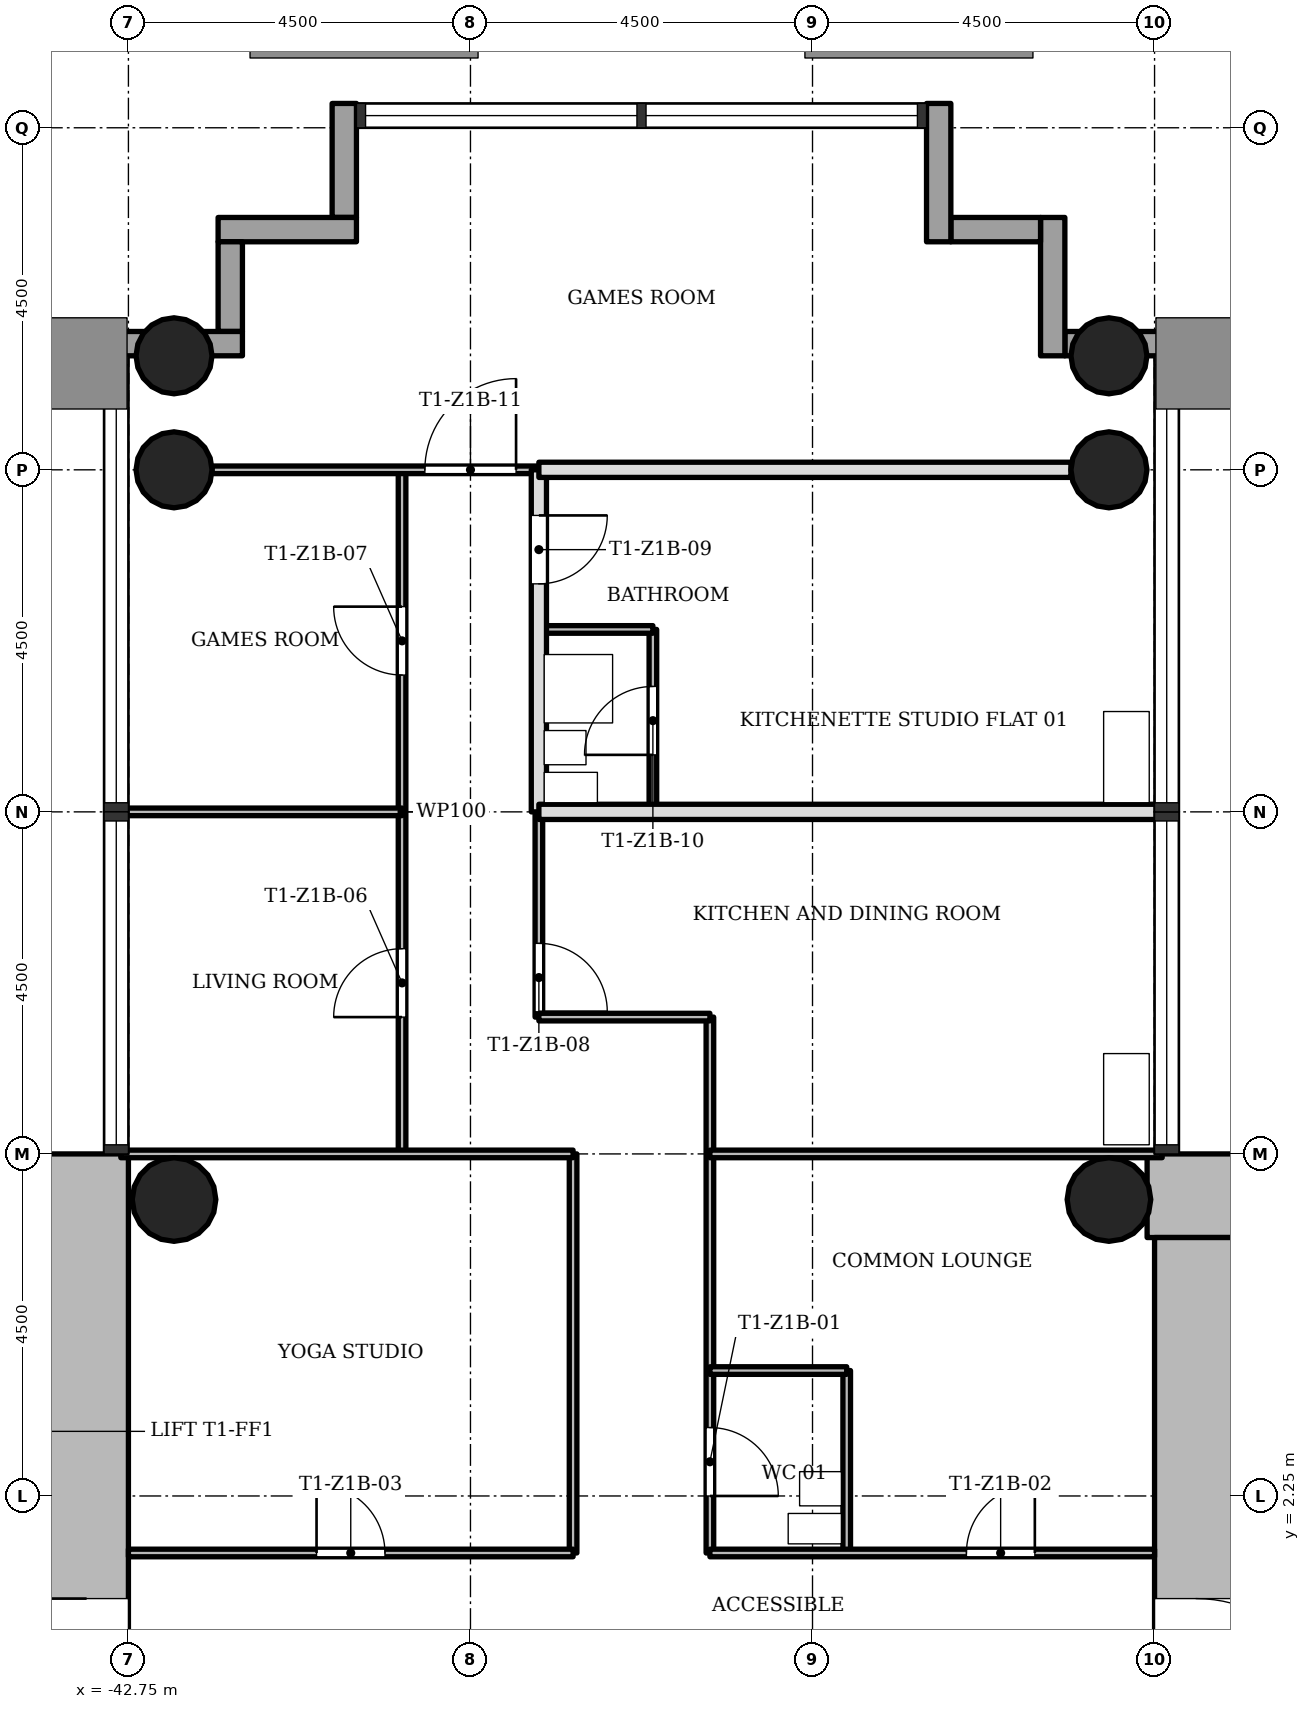
"""IFC4 building model, lengths in metres.
Left out: names, types, materials, properties, quantities, classifications, styles, units other than length and angle.
Written with IfcOpenShell. Run it as: python <this file> out.ifc"""

import sys

from ifc_helpers import new_model, si_unit, direction, frame, frame_2d, origin, origin_2d, place, context, subcontext, project, spatial, rectangle, hollow_circle, extrude, element, fill, save


model = new_model("IFC4")
c1 = context("Model", 3, precision=1e-05, world=origin(), true_north=direction((0.0, 1.0)))
c2 = subcontext(c1, "Body", "Model", "MODEL_VIEW")
j1 = project(units=[si_unit("LENGTHUNIT", "METRE"), si_unit("PLANEANGLEUNIT", "RADIAN")], contexts=[c1])
p1 = place(None, origin())
s1 = spatial("IfcSite", under=j1, at=p1, CompositionType="ELEMENT")
p2 = place(p1, origin())
s2 = spatial("IfcBuilding", under=s1, at=p2, CompositionType="ELEMENT")
p3 = place(p2, frame((0.0, 0.0, 38.1)))
s3 = spatial("IfcBuildingStorey", under=s2, at=p3, CompositionType="ELEMENT", Elevation=38.1)
p4 = place(p3, frame((-21.35, 6.2, 0.0), z_axis=(0.0, 0.0, 1.0), x_axis=(-1.0, 0.0, 0.0)))
e1 = element("IfcWall", 1, at=p4, inside=s3, PredefinedType="SHEAR", context=c2, shape_type="SweptSolid", body=[
    extrude(rectangle(XDim=7.998, YDim=1.1, at=frame_2d((3.999, 0.0))), origin(), (0.0, 0.0, 1.0), 3.4),
])
p5 = place(p3, frame((-28.7, 5.65, 0.0), z_axis=(0.0, 0.0, 1.0), x_axis=(0.0, -1.0, 0.0)))
e2 = element("IfcWall", 2, at=p5, inside=s3, PredefinedType="SHEAR", context=c2, shape_type="SweptSolid", body=[
    extrude(rectangle(XDim=12.4, YDim=1.1, at=frame_2d((6.2, 0.0))), origin(), (0.0, 0.0, 1.0), 3.4),
])
p6 = place(p5, frame((4.75, 0.0, 0.0)))
e3 = element("IfcOpeningElement", 3, at=p6, cuts=e2, PredefinedType="OPENING", context=c2, shape_type="SweptSolid", body=[
    extrude(rectangle(XDim=1.8, YDim=2.1, at=frame_2d((0.9, 1.05))), frame((0.0, 0.56, 0.0), z_axis=(0.0, -1.0, 0.0), x_axis=(1.0, 0.0, 0.0)), (0.0, 0.0, 1.0), 1.12),
])
p7 = place(p3, frame((-43.3, -5.65, 0.0), z_axis=(0.0, 0.0, 1.0), x_axis=(0.0, 1.0, 0.0)))
e4 = element("IfcWall", 4, at=p7, inside=s3, PredefinedType="SHEAR", context=c2, shape_type="SweptSolid", body=[
    extrude(rectangle(XDim=12.4, YDim=1.1, at=frame_2d((6.2, 0.0))), origin(), (0.0, 0.0, 1.0), 3.4),
])
p8 = place(p7, frame((4.75, 0.0, 0.0)))
e5 = element("IfcOpeningElement", 5, at=p8, cuts=e4, PredefinedType="OPENING", context=c2, shape_type="SweptSolid", body=[
    extrude(rectangle(XDim=1.8, YDim=2.1, at=frame_2d((0.9, 1.05))), frame((0.0, 0.56, 0.0), z_axis=(0.0, -1.0, 0.0), x_axis=(1.0, 0.0, 0.0)), (0.0, 0.0, 1.0), 1.12),
])
for number, where, z_axis, x_axis in (
    (6, (-29.85, 15.75, 0.0), (0.0, 0.0, 1.0), (1.0, 0.0, 0.0)),
    (7, (-42.15, 15.75, 0.0), (0.0, 0.0, 1.0), (1.0, 0.0, 0.0)),
    (8, (-29.85, 17.25, 0.0), (0.0, 0.0, 1.0), (1.0, 0.0, 0.0)),
    (9, (-42.15, 17.25, 0.0), (0.0, 0.0, 1.0), (1.0, 0.0, 0.0)),
):
    element("IfcColumn", number, at=place(p3, frame(where, z_axis=z_axis, x_axis=x_axis)), inside=s3, PredefinedType="COLUMN", context=c2, shape_type="SweptSolid", body=[
        extrude(hollow_circle(Radius=0.5, WallThickness=0.036, at=origin_2d()), origin(), (0.0, 0.0, 1.0), 3.4),
    ])
for number, where, z_axis, x_axis in (
    (10, (-29.85, 6.15, 0.0), (0.0, 0.0, 1.0), (1.0, 0.0, 0.0)),
    (11, (-42.15, 6.15, 0.0), (0.0, 0.0, 1.0), (1.0, 0.0, 0.0)),
):
    element("IfcColumn", number, at=place(p3, frame(where, z_axis=z_axis, x_axis=x_axis)), inside=s3, PredefinedType="COLUMN", context=c2, shape_type="SweptSolid", body=[
        extrude(hollow_circle(Radius=0.55, WallThickness=0.04, at=origin_2d()), origin(), (0.0, 0.0, 1.0), 3.4),
    ])
p9 = place(p3, frame((-28.93, 17.41, -0.3), z_axis=(0.0, 0.0, 1.0), x_axis=(-1.0, 0.0, 0.0)))
e12 = element("IfcWall", 12, at=p9, inside=s3, PredefinedType="STANDARD", context=c2, shape_type="SweptSolid", body=[
    extrude(rectangle(XDim=1.5, YDim=0.32, at=frame_2d((0.75, 0.0))), origin(), (0.0, 0.0, 1.0), 3.4),
])
p10 = place(p3, frame((-30.59, 17.25, -0.3), z_axis=(0.0, 0.0, 1.0), x_axis=(0.0, 1.0, 0.0)))
e13 = element("IfcWall", 13, at=p10, inside=s3, PredefinedType="STANDARD", context=c2, shape_type="SweptSolid", body=[
    extrude(rectangle(XDim=1.82, YDim=0.32, at=frame_2d((0.91, 0.0))), origin(), (0.0, 0.0, 1.0), 3.4),
])
p11 = place(p3, frame((-30.75, 18.91, -0.3), z_axis=(0.0, 0.0, 1.0), x_axis=(-1.0, 0.0, 0.0)))
e14 = element("IfcWall", 14, at=p11, inside=s3, PredefinedType="STANDARD", context=c2, shape_type="SweptSolid", body=[
    extrude(rectangle(XDim=1.18, YDim=0.32, at=frame_2d((0.59, 0.0))), origin(), (0.0, 0.0, 1.0), 3.4),
])
p12 = place(p3, frame((-32.09, 18.75, -0.3), z_axis=(0.0, 0.0, 1.0), x_axis=(0.0, 1.0, 0.0)))
e15 = element("IfcWall", 15, at=p12, inside=s3, PredefinedType="STANDARD", context=c2, shape_type="SweptSolid", body=[
    extrude(rectangle(XDim=1.82, YDim=0.32, at=frame_2d((0.91, 0.0))), origin(), (0.0, 0.0, 1.0), 3.4),
])
p13 = place(p3, frame((-39.91, 20.57, -0.3), z_axis=(0.0, 0.0, 1.0), x_axis=(0.0, -1.0, 0.0)))
e16 = element("IfcWall", 16, at=p13, inside=s3, PredefinedType="STANDARD", context=c2, shape_type="SweptSolid", body=[
    extrude(rectangle(XDim=1.5, YDim=0.32, at=frame_2d((0.75, 0.0))), origin(), (0.0, 0.0, 1.0), 3.4),
])
p14 = place(p3, frame((-39.75, 18.91, -0.3), z_axis=(0.0, 0.0, 1.0), x_axis=(-1.0, 0.0, 0.0)))
e17 = element("IfcWall", 17, at=p14, inside=s3, PredefinedType="STANDARD", context=c2, shape_type="SweptSolid", body=[
    extrude(rectangle(XDim=1.82, YDim=0.32, at=frame_2d((0.91, 0.0))), origin(), (0.0, 0.0, 1.0), 3.4),
])
p15 = place(p3, frame((-41.41, 18.75, -0.3), z_axis=(0.0, 0.0, 1.0), x_axis=(0.0, -1.0, 0.0)))
e18 = element("IfcWall", 18, at=p15, inside=s3, PredefinedType="STANDARD", context=c2, shape_type="SweptSolid", body=[
    extrude(rectangle(XDim=1.18, YDim=0.32, at=frame_2d((0.59, 0.0))), origin(), (0.0, 0.0, 1.0), 3.4),
])
p16 = place(p3, frame((-41.25, 17.41, -0.3), z_axis=(0.0, 0.0, 1.0), x_axis=(-1.0, 0.0, 0.0)))
e19 = element("IfcWall", 19, at=p16, inside=s3, PredefinedType="STANDARD", context=c2, shape_type="SweptSolid", body=[
    extrude(rectangle(XDim=1.82, YDim=0.32, at=frame_2d((0.91, 0.0))), origin(), (0.0, 0.0, 1.0), 3.4),
])
p17 = place(p3, frame((-39.15, 6.75, 0.0), z_axis=(0.0, 0.0, 1.0), x_axis=(0.0, 1.0, 0.0)))
e20 = element("IfcWall", 20, at=p17, inside=s3, PredefinedType="PARTITIONING", context=c2, shape_type="SweptSolid", body=[
    extrude(rectangle(XDim=9.0, YDim=0.1, at=frame_2d((4.5, 0.0))), origin(), (0.0, 0.0, 1.0), 3.0),
])
p18 = place(p17, frame((1.8, 0.0, 0.0)))
e21 = element("IfcOpeningElement", 21, at=p18, cuts=e20, PredefinedType="OPENING", context=c2, shape_type="SweptSolid", body=[
    extrude(rectangle(XDim=0.9, YDim=2.1, at=frame_2d((0.45, 1.05))), frame((0.0, 0.06, 0.0), z_axis=(0.0, -1.0, 0.0), x_axis=(1.0, 0.0, 0.0)), (0.0, 0.0, 1.0), 0.12),
])
p19 = place(p17, frame((6.3, 0.0, 0.0)))
e22 = element("IfcOpeningElement", 22, at=p19, cuts=e20, PredefinedType="OPENING", context=c2, shape_type="SweptSolid", body=[
    extrude(rectangle(XDim=0.9, YDim=2.1, at=frame_2d((0.45, 1.05))), frame((0.0, 0.06, 0.0), z_axis=(0.0, -1.0, 0.0), x_axis=(1.0, 0.0, 0.0)), (0.0, 0.0, 1.0), 0.12),
])
p20 = place(p3, frame((-37.35, 8.55, 0.0), z_axis=(0.0, 0.0, 1.0), x_axis=(0.0, 1.0, 0.0)))
e23 = element("IfcWall", 23, at=p20, inside=s3, PredefinedType="PARTITIONING", context=c2, shape_type="SweptSolid", body=[
    extrude(rectangle(XDim=2.7, YDim=0.1, at=frame_2d((1.35, 0.0))), origin(), (0.0, 0.0, 1.0), 3.0),
])
p21 = place(p20, frame((0.07, 0.0, 0.0)))
e24 = element("IfcOpeningElement", 24, at=p21, cuts=e23, PredefinedType="OPENING", context=c2, shape_type="SweptSolid", body=[
    extrude(rectangle(XDim=0.9, YDim=2.1, at=frame_2d((0.45, 1.05))), frame((0.0, 0.06, 0.0), z_axis=(0.0, -1.0, 0.0), x_axis=(1.0, 0.0, 0.0)), (0.0, 0.0, 1.0), 0.12),
])
p22 = place(p3, frame((-37.35, 11.25, 0.0), z_axis=(0.0, 0.0, 1.0), x_axis=(0.0, 1.0, 0.0)))
e25 = element("IfcWall", 25, at=p22, inside=s3, PredefinedType="SOLIDWALL", context=c2, shape_type="SweptSolid", body=[
    extrude(rectangle(XDim=4.5, YDim=0.2, at=frame_2d((2.25, 0.0))), origin(), (0.0, 0.0, 1.0), 3.0),
])
p23 = place(p22, frame((3.0, 0.0, 0.0)))
e26 = element("IfcOpeningElement", 26, at=p23, cuts=e25, PredefinedType="OPENING", context=c2, shape_type="SweptSolid", body=[
    extrude(rectangle(XDim=0.9, YDim=2.1, at=frame_2d((0.45, 1.05))), frame((0.0, 0.11, 0.0), z_axis=(0.0, -1.0, 0.0), x_axis=(1.0, 0.0, 0.0)), (0.0, 0.0, 1.0), 0.22),
])
p24 = place(p3, frame((-36.9, 1.5, 0.0), z_axis=(0.0, 0.0, 1.0), x_axis=(0.0, 1.0, 0.0)))
e27 = element("IfcWall", 27, at=p24, inside=s3, PredefinedType="PARTITIONING", context=c2, shape_type="SweptSolid", body=[
    extrude(rectangle(XDim=5.25, YDim=0.1, at=frame_2d((2.625, 0.0))), origin(), (0.0, 0.0, 1.0), 3.0),
])
p25 = place(p3, frame((-35.85, 11.25, 0.0), z_axis=(0.0, 0.0, 1.0), x_axis=(0.0, 1.0, 0.0)))
e28 = element("IfcWall", 28, at=p25, inside=s3, PredefinedType="PARTITIONING", context=c2, shape_type="SweptSolid", body=[
    extrude(rectangle(XDim=2.4, YDim=0.1, at=frame_2d((1.2, 0.0))), origin(), (0.0, 0.0, 1.0), 3.0),
])
p26 = place(p25, frame((0.75, 0.0, 0.0)))
e29 = element("IfcOpeningElement", 29, at=p26, cuts=e28, PredefinedType="OPENING", context=c2, shape_type="SweptSolid", body=[
    extrude(rectangle(XDim=0.9, YDim=2.1, at=frame_2d((0.45, 1.05))), frame((0.0, 0.06, 0.0), z_axis=(0.0, -1.0, 0.0), x_axis=(1.0, 0.0, 0.0)), (0.0, 0.0, 1.0), 0.12),
])
p27 = place(p3, frame((-35.1, 1.5, 0.0), z_axis=(0.0, 0.0, 1.0), x_axis=(0.0, 1.0, 0.0)))
e30 = element("IfcWall", 30, at=p27, inside=s3, PredefinedType="PARTITIONING", context=c2, shape_type="SweptSolid", body=[
    extrude(rectangle(XDim=7.05, YDim=0.1, at=frame_2d((3.525, 0.0))), origin(), (0.0, 0.0, 1.0), 3.0),
])
p28 = place(p27, frame((0.75, 0.0, 0.0)))
e31 = element("IfcOpeningElement", 31, at=p28, cuts=e30, PredefinedType="OPENING", context=c2, shape_type="SweptSolid", body=[
    extrude(rectangle(XDim=0.9, YDim=2.1, at=frame_2d((0.45, 1.05))), frame((0.0, 0.06, 0.0), z_axis=(0.0, -1.0, 0.0), x_axis=(1.0, 0.0, 0.0)), (0.0, 0.0, 1.0), 0.12),
])
p29 = place(p3, frame((-33.3, 1.5, 0.0), z_axis=(0.0, 0.0, 1.0), x_axis=(0.0, 1.0, 0.0)))
e32 = element("IfcWall", 32, at=p29, inside=s3, PredefinedType="PARTITIONING", context=c2, shape_type="SweptSolid", body=[
    extrude(rectangle(XDim=2.4, YDim=0.1, at=frame_2d((1.2, 0.0))), origin(), (0.0, 0.0, 1.0), 3.0),
])
p30 = place(p3, frame((-42.75, 1.5, 0.0), z_axis=(0.0, 0.0, 1.0), x_axis=(1.0, 0.0, 0.0)))
e33 = element("IfcWall", 33, at=p30, inside=s3, PredefinedType="PARTITIONING", context=c2, shape_type="SweptSolid", body=[
    extrude(rectangle(XDim=5.85, YDim=0.1, at=frame_2d((2.925, 0.0))), origin(), (0.0, 0.0, 1.0), 3.0),
])
p31 = place(p30, frame((2.475, 0.0, 0.0)))
e34 = element("IfcOpeningElement", 34, at=p31, cuts=e33, PredefinedType="OPENING", context=c2, shape_type="SweptSolid", body=[
    extrude(rectangle(XDim=0.9, YDim=2.1, at=frame_2d((0.45, 1.05))), frame((0.0, 0.06, 0.0), z_axis=(0.0, -1.0, 0.0), x_axis=(1.0, 0.0, 0.0)), (0.0, 0.0, 1.0), 0.12),
])
p32 = place(p3, frame((-35.1, 1.5, 0.0), z_axis=(0.0, 0.0, 1.0), x_axis=(1.0, 0.0, 0.0)))
e35 = element("IfcWall", 35, at=p32, inside=s3, PredefinedType="PARTITIONING", context=c2, shape_type="SweptSolid", body=[
    extrude(rectangle(XDim=5.85, YDim=0.1, at=frame_2d((2.925, 0.0))), origin(), (0.0, 0.0, 1.0), 3.0),
])
p33 = place(p32, frame((3.375, 0.0, 0.0)))
e36 = element("IfcOpeningElement", 36, at=p33, cuts=e35, PredefinedType="OPENING", context=c2, shape_type="SweptSolid", body=[
    extrude(rectangle(XDim=0.9, YDim=2.1, at=frame_2d((0.45, 1.05))), frame((0.0, 0.06, 0.0), z_axis=(0.0, -1.0, 0.0), x_axis=(1.0, 0.0, 0.0)), (0.0, 0.0, 1.0), 0.12),
])
p34 = place(p3, frame((-35.1, 3.9, 0.0), z_axis=(0.0, 0.0, 1.0), x_axis=(1.0, 0.0, 0.0)))
e37 = element("IfcWall", 37, at=p34, inside=s3, PredefinedType="PARTITIONING", context=c2, shape_type="SweptSolid", body=[
    extrude(rectangle(XDim=1.8, YDim=0.1, at=frame_2d((0.9, 0.0))), origin(), (0.0, 0.0, 1.0), 3.0),
])
for number, where, z_axis, x_axis in (
    (38, (-42.85, 6.75, 0.0), (0.0, 0.0, 1.0), (1.0, 0.0, 0.0)),
    (39, (-35.1, 6.75, 0.0), (0.0, 0.0, 1.0), (1.0, 0.0, 0.0)),
):
    element("IfcWall", number, at=place(p3, frame(where, z_axis=z_axis, x_axis=x_axis)), inside=s3, PredefinedType="PARTITIONING", context=c2, shape_type="SweptSolid", body=[
        extrude(rectangle(XDim=5.95, YDim=0.1, at=frame_2d((2.975, 0.0))), origin(), (0.0, 0.0, 1.0), 3.0),
    ])
p35 = place(p3, frame((-37.35, 8.55, 0.0), z_axis=(0.0, 0.0, 1.0), x_axis=(1.0, 0.0, 0.0)))
e40 = element("IfcWall", 40, at=p35, inside=s3, PredefinedType="PARTITIONING", context=c2, shape_type="SweptSolid", body=[
    extrude(rectangle(XDim=2.25, YDim=0.1, at=frame_2d((1.125, 0.0))), origin(), (0.0, 0.0, 1.0), 3.0),
])
p36 = place(p3, frame((-42.85, 11.25, 0.0), z_axis=(0.0, 0.0, 1.0), x_axis=(1.0, 0.0, 0.0)))
e41 = element("IfcWall", 41, at=p36, inside=s3, PredefinedType="PARTITIONING", context=c2, shape_type="SweptSolid", body=[
    extrude(rectangle(XDim=3.7, YDim=0.1, at=frame_2d((1.85, 0.0))), origin(), (0.0, 0.0, 1.0), 3.0),
])
p37 = place(p3, frame((-37.35, 11.25, 0.0), z_axis=(0.0, 0.0, 1.0), x_axis=(1.0, 0.0, 0.0)))
e42 = element("IfcWall", 42, at=p37, inside=s3, PredefinedType="SOLIDWALL", context=c2, shape_type="SweptSolid", body=[
    extrude(rectangle(XDim=8.2, YDim=0.2, at=frame_2d((4.1, 0.0))), origin(), (0.0, 0.0, 1.0), 3.0),
])
p38 = place(p3, frame((-37.35, 13.65, 0.0), z_axis=(0.0, 0.0, 1.0), x_axis=(1.0, 0.0, 0.0)))
e43 = element("IfcWall", 43, at=p38, inside=s3, PredefinedType="PARTITIONING", context=c2, shape_type="SweptSolid", body=[
    extrude(rectangle(XDim=1.5, YDim=0.1, at=frame_2d((0.75, 0.0))), origin(), (0.0, 0.0, 1.0), 3.0),
])
p39 = place(p3, frame((-41.65, 15.75, 0.0), z_axis=(0.0, 0.0, 1.0), x_axis=(1.0, 0.0, 0.0)))
e44 = element("IfcWall", 44, at=p39, inside=s3, PredefinedType="PARTITIONING", context=c2, shape_type="SweptSolid", body=[
    extrude(rectangle(XDim=4.3, YDim=0.1, at=frame_2d((2.15, 0.0))), origin(), (0.0, 0.0, 1.0), 3.0),
])
p40 = place(p39, frame((2.8, 0.0, 0.0)))
e45 = element("IfcOpeningElement", 45, at=p40, cuts=e44, PredefinedType="OPENING", context=c2, shape_type="SweptSolid", body=[
    extrude(rectangle(XDim=1.2, YDim=2.1, at=frame_2d((0.6, 1.05))), frame((0.0, 0.06, 0.0), z_axis=(0.0, -1.0, 0.0), x_axis=(1.0, 0.0, 0.0)), (0.0, 0.0, 1.0), 0.12),
])
p41 = place(p3, frame((-37.35, 15.75, 0.0), z_axis=(0.0, 0.0, 1.0), x_axis=(1.0, 0.0, 0.0)))
e46 = element("IfcWall", 46, at=p41, inside=s3, PredefinedType="SOLIDWALL", context=c2, shape_type="SweptSolid", body=[
    extrude(rectangle(XDim=7.0, YDim=0.2, at=frame_2d((3.5, 0.0))), origin(), (0.0, 0.0, 1.0), 3.0),
])
p42 = place(p28, origin())
e47 = element("IfcDoor", 47, at=p42, inside=s3, OperationType="SINGLE_SWING_LEFT", PredefinedType="DOOR", context=c2, shape_type="SweptSolid", body=[
    extrude(rectangle(XDim=0.9, YDim=2.1, at=frame_2d((0.45, 1.05))), frame((0.0, 0.025, 0.0), z_axis=(0.0, -1.0, 0.0), x_axis=(1.0, 0.0, 0.0)), (0.0, 0.0, 1.0), 0.05),
])
fill(e31, e47)
p43 = place(p33, origin())
e48 = element("IfcDoor", 48, at=p43, inside=s3, OperationType="SINGLE_SWING_LEFT", PredefinedType="DOOR", context=c2, shape_type="SweptSolid", body=[
    extrude(rectangle(XDim=0.9, YDim=2.1, at=frame_2d((0.45, 1.05))), frame((0.0, 0.025, 0.0), z_axis=(0.0, -1.0, 0.0), x_axis=(1.0, 0.0, 0.0)), (0.0, 0.0, 1.0), 0.05),
])
fill(e36, e48)
p44 = place(p31, origin())
e49 = element("IfcDoor", 49, at=p44, inside=s3, OperationType="SINGLE_SWING_RIGHT", PredefinedType="DOOR", context=c2, shape_type="SweptSolid", body=[
    extrude(rectangle(XDim=0.9, YDim=2.1, at=frame_2d((0.45, 1.05))), frame((0.0, 0.025, 0.0), z_axis=(0.0, -1.0, 0.0), x_axis=(1.0, 0.0, 0.0)), (0.0, 0.0, 1.0), 0.05),
])
fill(e34, e49)
p45 = place(p18, origin())
e50 = element("IfcDoor", 50, at=p45, inside=s3, OperationType="SINGLE_SWING_RIGHT", PredefinedType="DOOR", context=c2, shape_type="SweptSolid", body=[
    extrude(rectangle(XDim=0.9, YDim=2.1, at=frame_2d((0.45, 1.05))), frame((0.0, 0.025, 0.0), z_axis=(0.0, -1.0, 0.0), x_axis=(1.0, 0.0, 0.0)), (0.0, 0.0, 1.0), 0.05),
])
fill(e21, e50)
p46 = place(p19, origin())
e51 = element("IfcDoor", 51, at=p46, inside=s3, OperationType="SINGLE_SWING_LEFT", PredefinedType="DOOR", context=c2, shape_type="SweptSolid", body=[
    extrude(rectangle(XDim=0.9, YDim=2.1, at=frame_2d((0.45, 1.05))), frame((0.0, 0.025, 0.0), z_axis=(0.0, -1.0, 0.0), x_axis=(1.0, 0.0, 0.0)), (0.0, 0.0, 1.0), 0.05),
])
fill(e22, e51)
p47 = place(p21, origin())
e52 = element("IfcDoor", 52, at=p47, inside=s3, OperationType="SINGLE_SWING_LEFT", PredefinedType="DOOR", context=c2, shape_type="SweptSolid", body=[
    extrude(rectangle(XDim=0.9, YDim=2.1, at=frame_2d((0.45, 1.05))), frame((0.0, 0.025, 0.0), z_axis=(0.0, -1.0, 0.0), x_axis=(1.0, 0.0, 0.0)), (0.0, 0.0, 1.0), 0.05),
])
fill(e24, e52)
p48 = place(p23, origin())
e53 = element("IfcDoor", 53, at=p48, inside=s3, OperationType="SINGLE_SWING_RIGHT", PredefinedType="DOOR", context=c2, shape_type="SweptSolid", body=[
    extrude(rectangle(XDim=0.9, YDim=2.1, at=frame_2d((0.45, 1.05))), frame((0.0, 0.025, 0.0), z_axis=(0.0, -1.0, 0.0), x_axis=(1.0, 0.0, 0.0)), (0.0, 0.0, 1.0), 0.05),
])
fill(e26, e53)
p49 = place(p26, origin())
e54 = element("IfcDoor", 54, at=p49, inside=s3, OperationType="SINGLE_SWING_RIGHT", PredefinedType="DOOR", context=c2, shape_type="SweptSolid", body=[
    extrude(rectangle(XDim=0.9, YDim=2.1, at=frame_2d((0.45, 1.05))), frame((0.0, 0.025, 0.0), z_axis=(0.0, -1.0, 0.0), x_axis=(1.0, 0.0, 0.0)), (0.0, 0.0, 1.0), 0.05),
])
fill(e29, e54)
p50 = place(p40, origin())
e55 = element("IfcDoor", 55, at=p50, inside=s3, OperationType="SINGLE_SWING_LEFT", PredefinedType="DOOR", context=c2, shape_type="SweptSolid", body=[
    extrude(rectangle(XDim=1.2, YDim=2.1, at=frame_2d((0.6, 1.05))), frame((0.0, 0.025, 0.0), z_axis=(0.0, -1.0, 0.0), x_axis=(1.0, 0.0, 0.0)), (0.0, 0.0, 1.0), 0.05),
])
fill(e45, e55)
p51 = place(p6, origin())
e56 = element("IfcDoor", 56, at=p51, inside=s3, OperationType="SINGLE_SWING_LEFT", PredefinedType="DOOR", context=c2, shape_type="SweptSolid", body=[
    extrude(rectangle(XDim=1.8, YDim=2.1, at=frame_2d((0.9, 1.05))), frame((0.0, 0.025, 0.0), z_axis=(0.0, -1.0, 0.0), x_axis=(1.0, 0.0, 0.0)), (0.0, 0.0, 1.0), 0.05),
])
fill(e3, e56)
p52 = place(p8, origin())
e57 = element("IfcDoor", 57, at=p52, inside=s3, OperationType="SINGLE_SWING_LEFT", PredefinedType="DOOR", context=c2, shape_type="SweptSolid", body=[
    extrude(rectangle(XDim=1.8, YDim=2.1, at=frame_2d((0.9, 1.05))), frame((0.0, 0.025, 0.0), z_axis=(0.0, -1.0, 0.0), x_axis=(1.0, 0.0, 0.0)), (0.0, 0.0, 1.0), 0.05),
])
fill(e5, e57)
save(model, sys.argv[1])
